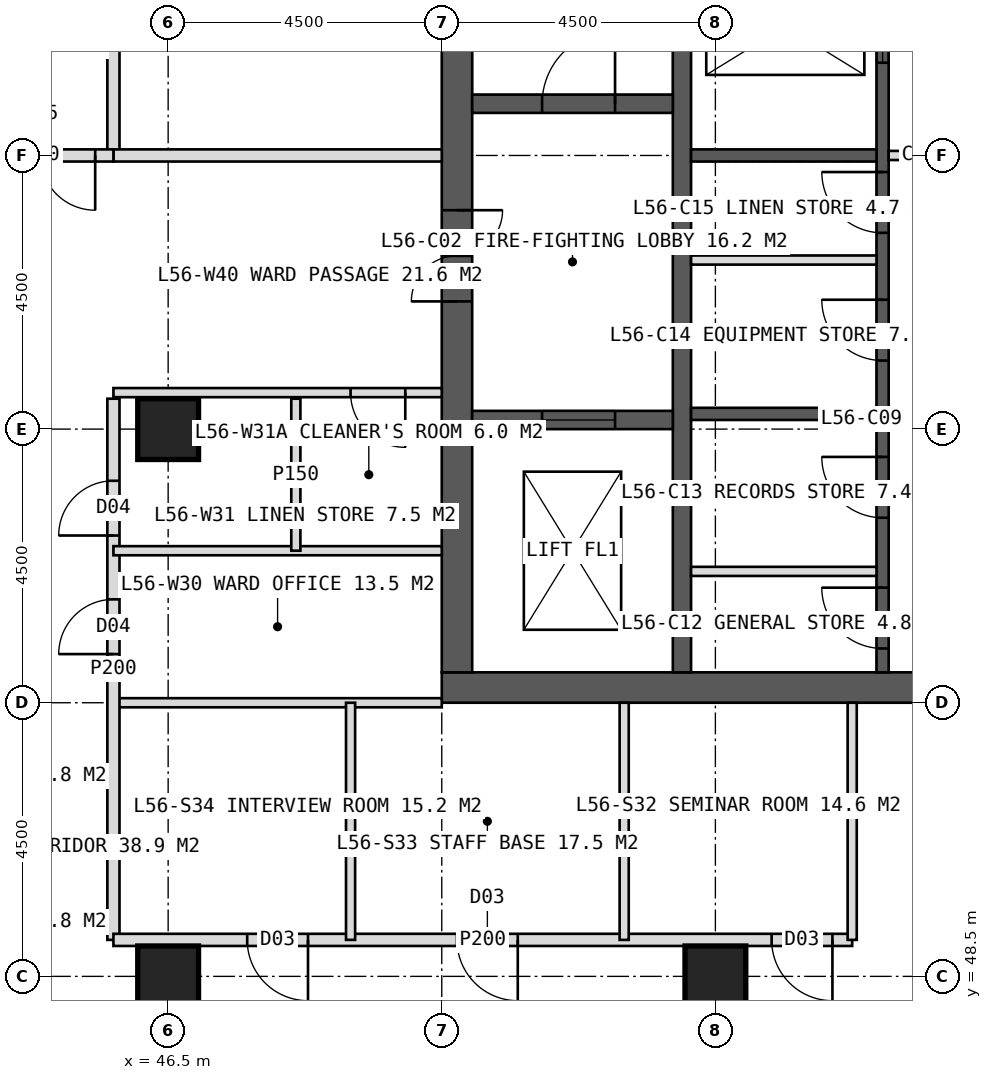
"""IFC4 building model, lengths in metres.
Left out: names, types, materials, properties, quantities, classifications, styles, units other than length and angle.
Written with IfcOpenShell. Run it as: python <this file> out.ifc"""

import sys

from ifc_helpers import new_model, si_unit, direction, frame, frame_2d, origin, origin_2d, place, context, subcontext, project, spatial, rectangle, hollow_rectangle, extrude, element, fill, save


model = new_model("IFC4")
c1 = context("Model", 3, precision=1e-05, world=origin(), true_north=direction((0.0, 1.0)))
c2 = subcontext(c1, "Body", "Model", "MODEL_VIEW")
j1 = project(units=[si_unit("LENGTHUNIT", "METRE"), si_unit("PLANEANGLEUNIT", "RADIAN")], contexts=[c1])
p1 = place(None, origin())
s1 = spatial("IfcSite", under=j1, at=p1, CompositionType="ELEMENT")
p2 = place(p1, origin())
s2 = spatial("IfcBuilding", under=s1, at=p2, CompositionType="ELEMENT")
p3 = place(p2, frame((0.0, 0.0, 233.0)))
s3 = spatial("IfcBuildingStorey", under=s2, at=p3, CompositionType="ELEMENT", Elevation=233.0)
p4 = place(p3, frame((51.0, 53.25, 0.0), z_axis=(0.0, 0.0, 1.0), x_axis=(1.0, 0.0, 0.0)))
e1 = element("IfcWall", 1, at=p4, inside=s3, PredefinedType="SHEAR", context=c2, shape_type="SweptSolid", body=[
    extrude(rectangle(XDim=18.0, YDim=0.5, at=frame_2d((9.0, 0.0))), origin(), (0.0, 0.0, 1.0), 4.0),
])
p5 = place(p4, frame((8.1, 0.0, 0.0)))
e2 = element("IfcOpeningElement", 2, at=p5, cuts=e1, PredefinedType="OPENING", context=c2, shape_type="SweptSolid", body=[
    extrude(rectangle(XDim=1.8, YDim=2.2, at=frame_2d((0.9, 1.1))), frame((0.0, 0.26, 0.0), z_axis=(0.0, -1.0, 0.0), x_axis=(1.0, 0.0, 0.0)), (0.0, 0.0, 1.0), 0.52),
])
p6 = place(p3, frame((51.25, 53.5, 0.0), z_axis=(0.0, 0.0, 1.0), x_axis=(0.0, 1.0, 0.0)))
e3 = element("IfcWall", 3, at=p6, inside=s3, PredefinedType="SHEAR", context=c2, shape_type="SweptSolid", body=[
    extrude(rectangle(XDim=17.0, YDim=0.5, at=frame_2d((8.5, 0.0))), origin(), (0.0, 0.0, 1.0), 4.0),
])
p7 = place(p6, frame((6.1, 0.0, 0.0)))
e4 = element("IfcOpeningElement", 4, at=p7, cuts=e3, PredefinedType="OPENING", context=c2, shape_type="SweptSolid", body=[
    extrude(rectangle(XDim=1.5, YDim=2.2, at=frame_2d((0.75, 1.1))), frame((0.0, 0.26, 0.0), z_axis=(0.0, -1.0, 0.0), x_axis=(1.0, 0.0, 0.0)), (0.0, 0.0, 1.0), 0.52),
])
p8 = place(p3, frame((54.95, 53.5, 0.0), z_axis=(0.0, 0.0, 1.0), x_axis=(0.0, 1.0, 0.0)))
e5 = element("IfcWall", 5, at=p8, inside=s3, PredefinedType="SHEAR", context=c2, shape_type="SweptSolid", body=[
    extrude(rectangle(XDim=17.0, YDim=0.3, at=frame_2d((8.5, 0.0))), origin(), (0.0, 0.0, 1.0), 4.0),
])
p9 = place(p3, frame((58.25, 53.5, 0.0), z_axis=(0.0, 0.0, 1.0), x_axis=(0.0, 1.0, 0.0)))
e6 = element("IfcWall", 6, at=p9, inside=s3, PredefinedType="SHEAR", context=c2, shape_type="SweptSolid", body=[
    extrude(rectangle(XDim=17.0, YDim=0.2, at=frame_2d((8.5, 0.0))), origin(), (0.0, 0.0, 1.0), 4.0),
])
p10 = place(p9, frame((0.393, 0.0, 0.0)))
e7 = element("IfcOpeningElement", 7, at=p10, cuts=e6, PredefinedType="OPENING", context=c2, shape_type="SweptSolid", body=[
    extrude(rectangle(XDim=1.0, YDim=2.1, at=frame_2d((0.5, 1.05))), frame((0.0, 0.11, 0.0), z_axis=(0.0, -1.0, 0.0), x_axis=(1.0, 0.0, 0.0)), (0.0, 0.0, 1.0), 0.22),
])
p11 = place(p9, frame((2.542, 0.0, 0.0)))
e8 = element("IfcOpeningElement", 8, at=p11, cuts=e6, PredefinedType="OPENING", context=c2, shape_type="SweptSolid", body=[
    extrude(rectangle(XDim=1.0, YDim=2.1, at=frame_2d((0.5, 1.05))), frame((0.0, 0.11, 0.0), z_axis=(0.0, -1.0, 0.0), x_axis=(1.0, 0.0, 0.0)), (0.0, 0.0, 1.0), 0.22),
])
p12 = place(p9, frame((5.127, 0.0, 0.0)))
e9 = element("IfcOpeningElement", 9, at=p12, cuts=e6, PredefinedType="OPENING", context=c2, shape_type="SweptSolid", body=[
    extrude(rectangle(XDim=1.0, YDim=2.1, at=frame_2d((0.5, 1.05))), frame((0.0, 0.11, 0.0), z_axis=(0.0, -1.0, 0.0), x_axis=(1.0, 0.0, 0.0)), (0.0, 0.0, 1.0), 0.22),
])
p13 = place(p9, frame((7.228, 0.0, 0.0)))
e10 = element("IfcOpeningElement", 10, at=p13, cuts=e6, PredefinedType="OPENING", context=c2, shape_type="SweptSolid", body=[
    extrude(rectangle(XDim=1.0, YDim=2.1, at=frame_2d((0.5, 1.05))), frame((0.0, 0.11, 0.0), z_axis=(0.0, -1.0, 0.0), x_axis=(1.0, 0.0, 0.0)), (0.0, 0.0, 1.0), 0.22),
])
p14 = place(p9, frame((10.025, 0.0, 0.0)))
e11 = element("IfcOpeningElement", 11, at=p14, cuts=e6, PredefinedType="OPENING", context=c2, shape_type="SweptSolid", body=[
    extrude(rectangle(XDim=1.4, YDim=2.2, at=frame_2d((0.7, 1.1))), frame((0.0, 0.11, 0.0), z_axis=(0.0, -1.0, 0.0), x_axis=(1.0, 0.0, 0.0)), (0.0, 0.0, 1.0), 0.22),
])
p15 = place(p9, frame((14.325, 0.0, 0.0)))
e12 = element("IfcOpeningElement", 12, at=p15, cuts=e6, PredefinedType="OPENING", context=c2, shape_type="SweptSolid", body=[
    extrude(rectangle(XDim=1.4, YDim=2.2, at=frame_2d((0.7, 1.1))), frame((0.0, 0.11, 0.0), z_axis=(0.0, -1.0, 0.0), x_axis=(1.0, 0.0, 0.0)), (0.0, 0.0, 1.0), 0.22),
])
for number, where, z_axis, x_axis in (
    (13, (55.1, 57.75, 0.0), (0.0, 0.0, 1.0), (1.0, 0.0, 0.0)),
    (14, (55.1, 62.0, 0.0), (0.0, 0.0, 1.0), (1.0, 0.0, 0.0)),
):
    element("IfcWall", number, at=place(p3, frame(where, z_axis=z_axis, x_axis=x_axis)), inside=s3, PredefinedType="SHEAR", context=c2, shape_type="SweptSolid", body=[
        extrude(rectangle(XDim=3.05, YDim=0.2, at=frame_2d((1.525, 0.0))), origin(), (0.0, 0.0, 1.0), 4.0),
    ])
p16 = place(p3, frame((51.5, 62.85, 0.0), z_axis=(0.0, 0.0, 1.0), x_axis=(1.0, 0.0, 0.0)))
e15 = element("IfcWall", 15, at=p16, inside=s3, PredefinedType="SHEAR", context=c2, shape_type="SweptSolid", body=[
    extrude(rectangle(XDim=3.3, YDim=0.3, at=frame_2d((1.65, 0.0))), origin(), (0.0, 0.0, 1.0), 4.0),
])
p17 = place(p16, frame((1.15, 0.0, 0.0)))
e16 = element("IfcOpeningElement", 16, at=p17, cuts=e15, PredefinedType="OPENING", context=c2, shape_type="SweptSolid", body=[
    extrude(rectangle(XDim=1.2, YDim=2.1, at=frame_2d((0.6, 1.05))), frame((0.0, 0.16, 0.0), z_axis=(0.0, -1.0, 0.0), x_axis=(1.0, 0.0, 0.0)), (0.0, 0.0, 1.0), 0.32),
])
p18 = place(p3, frame((51.5, 57.65, 0.0), z_axis=(0.0, 0.0, 1.0), x_axis=(1.0, 0.0, 0.0)))
e17 = element("IfcWall", 17, at=p18, inside=s3, PredefinedType="SHEAR", context=c2, shape_type="SweptSolid", body=[
    extrude(rectangle(XDim=3.3, YDim=0.3, at=frame_2d((1.65, 0.0))), origin(), (0.0, 0.0, 1.0), 4.0),
])
p19 = place(p18, frame((1.15, 0.0, 0.0)))
e18 = element("IfcOpeningElement", 18, at=p19, cuts=e17, PredefinedType="OPENING", context=c2, shape_type="SweptSolid", body=[
    extrude(rectangle(XDim=1.2, YDim=2.2, at=frame_2d((0.6, 1.1))), frame((0.0, 0.16, 0.0), z_axis=(0.0, -1.0, 0.0), x_axis=(1.0, 0.0, 0.0)), (0.0, 0.0, 1.0), 0.32),
])
for number, where, z_axis, x_axis in (
    (19, (46.5, 48.5, 0.0), (0.0, 0.0, 1.0), (1.0, 0.0, 0.0)),
    (20, (55.5, 48.5, 0.0), (0.0, 0.0, 1.0), (1.0, 0.0, 0.0)),
    (21, (46.5, 57.5, 0.0), (0.0, 0.0, 1.0), (1.0, 0.0, 0.0)),
):
    element("IfcColumn", number, at=place(p3, frame(where, z_axis=z_axis, x_axis=x_axis)), inside=s3, PredefinedType="COLUMN", context=c2, shape_type="SweptSolid", body=[
        extrude(hollow_rectangle(XDim=1.0, YDim=1.0, WallThickness=0.1, at=origin_2d()), origin(), (0.0, 0.0, 1.0), 4.0),
    ])
p20 = place(p3, frame((51.0, 53.0, 0.0), z_axis=(0.0, 0.0, 1.0), x_axis=(-1.0, 0.0, 0.0)))
e22 = element("IfcWall", 22, at=p20, inside=s3, PredefinedType="PARTITIONING", context=c2, shape_type="SweptSolid", body=[
    extrude(rectangle(XDim=5.4, YDim=0.15, at=frame_2d((2.7, 0.0))), origin(), (0.0, 0.0, 1.0), 3.75),
])
p21 = place(p3, frame((45.6, 49.1, 0.0), z_axis=(0.0, 0.0, 1.0), x_axis=(0.0, 1.0, 0.0)))
e23 = element("IfcWall", 23, at=p21, inside=s3, PredefinedType="PARTITIONING", context=c2, shape_type="SweptSolid", body=[
    extrude(rectangle(XDim=8.9, YDim=0.2, at=frame_2d((4.45, 0.0))), origin(), (0.0, 0.0, 1.0), 3.75),
])
p22 = place(p21, frame((4.7, 0.0, 0.0)))
e24 = element("IfcOpeningElement", 24, at=p22, cuts=e23, PredefinedType="OPENING", context=c2, shape_type="SweptSolid", body=[
    extrude(rectangle(XDim=0.9, YDim=2.1, at=frame_2d((0.45, 1.05))), frame((0.0, 0.11, 0.0), z_axis=(0.0, -1.0, 0.0), x_axis=(1.0, 0.0, 0.0)), (0.0, 0.0, 1.0), 0.22),
])
p23 = place(p21, frame((6.65, 0.0, 0.0)))
e25 = element("IfcOpeningElement", 25, at=p23, cuts=e23, PredefinedType="OPENING", context=c2, shape_type="SweptSolid", body=[
    extrude(rectangle(XDim=0.9, YDim=2.1, at=frame_2d((0.45, 1.05))), frame((0.0, 0.11, 0.0), z_axis=(0.0, -1.0, 0.0), x_axis=(1.0, 0.0, 0.0)), (0.0, 0.0, 1.0), 0.22),
])
p24 = place(p3, frame((45.6, 62.0, 0.0), z_axis=(0.0, 0.0, 1.0), x_axis=(0.0, 1.0, 0.0)))
e26 = element("IfcWall", 26, at=p24, inside=s3, PredefinedType="PARTITIONING", context=c2, shape_type="SweptSolid", body=[
    extrude(rectangle(XDim=14.4, YDim=0.2, at=frame_2d((7.2, 0.0))), origin(), (0.0, 0.0, 1.0), 3.75),
])
p25 = place(p24, frame((2.5, 0.0, 0.0)))
e27 = element("IfcOpeningElement", 27, at=p25, cuts=e26, PredefinedType="OPENING", context=c2, shape_type="SweptSolid", body=[
    extrude(rectangle(XDim=1.0, YDim=2.1, at=frame_2d((0.5, 1.05))), frame((0.0, 0.11, 0.0), z_axis=(0.0, -1.0, 0.0), x_axis=(1.0, 0.0, 0.0)), (0.0, 0.0, 1.0), 0.22),
])
p26 = place(p24, frame((7.0, 0.0, 0.0)))
e28 = element("IfcOpeningElement", 28, at=p26, cuts=e26, PredefinedType="OPENING", context=c2, shape_type="SweptSolid", body=[
    extrude(rectangle(XDim=1.0, YDim=2.1, at=frame_2d((0.5, 1.05))), frame((0.0, 0.11, 0.0), z_axis=(0.0, -1.0, 0.0), x_axis=(1.0, 0.0, 0.0)), (0.0, 0.0, 1.0), 0.22),
])
p27 = place(p24, frame((11.2, 0.0, 0.0)))
e29 = element("IfcOpeningElement", 29, at=p27, cuts=e26, PredefinedType="OPENING", context=c2, shape_type="SweptSolid", body=[
    extrude(rectangle(XDim=1.0, YDim=2.1, at=frame_2d((0.5, 1.05))), frame((0.0, 0.11, 0.0), z_axis=(0.0, -1.0, 0.0), x_axis=(1.0, 0.0, 0.0)), (0.0, 0.0, 1.0), 0.22),
])
p28 = place(p3, frame((51.0, 58.1, 0.0), z_axis=(0.0, 0.0, 1.0), x_axis=(-1.0, 0.0, 0.0)))
e30 = element("IfcWall", 30, at=p28, inside=s3, PredefinedType="PARTITIONING", context=c2, shape_type="SweptSolid", body=[
    extrude(rectangle(XDim=5.4, YDim=0.15, at=frame_2d((2.7, 0.0))), origin(), (0.0, 0.0, 1.0), 3.75),
])
p29 = place(p28, frame((0.6, 0.0, 0.0)))
e31 = element("IfcOpeningElement", 31, at=p29, cuts=e30, PredefinedType="OPENING", context=c2, shape_type="SweptSolid", body=[
    extrude(rectangle(XDim=0.9, YDim=2.1, at=frame_2d((0.45, 1.05))), frame((0.0, 0.085, 0.0), z_axis=(0.0, -1.0, 0.0), x_axis=(1.0, 0.0, 0.0)), (0.0, 0.0, 1.0), 0.17),
])
p30 = place(p3, frame((51.0, 62.0, 0.0), z_axis=(0.0, 0.0, 1.0), x_axis=(-1.0, 0.0, 0.0)))
e32 = element("IfcWall", 32, at=p30, inside=s3, PredefinedType="SOLIDWALL", context=c2, shape_type="SweptSolid", body=[
    extrude(rectangle(XDim=5.4, YDim=0.2, at=frame_2d((2.7, 0.0))), origin(), (0.0, 0.0, 1.0), 2.95),
])
p31 = place(p3, frame((51.0, 55.5, 0.0), z_axis=(0.0, 0.0, 1.0), x_axis=(-1.0, 0.0, 0.0)))
e33 = element("IfcWall", 33, at=p31, inside=s3, PredefinedType="PARTITIONING", context=c2, shape_type="SweptSolid", body=[
    extrude(rectangle(XDim=5.4, YDim=0.15, at=frame_2d((2.7, 0.0))), origin(), (0.0, 0.0, 1.0), 3.75),
])
p32 = place(p3, frame((48.6, 55.5, 0.0), z_axis=(0.0, 0.0, 1.0), x_axis=(0.0, 1.0, 0.0)))
e34 = element("IfcWall", 34, at=p32, inside=s3, PredefinedType="PARTITIONING", context=c2, shape_type="SweptSolid", body=[
    extrude(rectangle(XDim=2.5, YDim=0.15, at=frame_2d((1.25, 0.0))), origin(), (0.0, 0.0, 1.0), 3.75),
])
p33 = place(p3, frame((57.75, 49.1, 0.0), z_axis=(0.0, 0.0, 1.0), x_axis=(-1.0, 0.0, 0.0)))
e35 = element("IfcWall", 35, at=p33, inside=s3, PredefinedType="PARTITIONING", context=c2, shape_type="SweptSolid", body=[
    extrude(rectangle(XDim=12.15, YDim=0.2, at=frame_2d((6.075, 0.0))), origin(), (0.0, 0.0, 1.0), 3.75),
])
p34 = place(p33, frame((0.325, 0.0, 0.0)))
e36 = element("IfcOpeningElement", 36, at=p34, cuts=e35, PredefinedType="OPENING", context=c2, shape_type="SweptSolid", body=[
    extrude(rectangle(XDim=1.0, YDim=2.1, at=frame_2d((0.5, 1.05))), frame((0.0, 0.11, 0.0), z_axis=(0.0, -1.0, 0.0), x_axis=(1.0, 0.0, 0.0)), (0.0, 0.0, 1.0), 0.22),
])
p35 = place(p33, frame((5.5, 0.0, 0.0)))
e37 = element("IfcOpeningElement", 37, at=p35, cuts=e35, PredefinedType="OPENING", context=c2, shape_type="SweptSolid", body=[
    extrude(rectangle(XDim=1.0, YDim=2.1, at=frame_2d((0.5, 1.05))), frame((0.0, 0.11, 0.0), z_axis=(0.0, -1.0, 0.0), x_axis=(1.0, 0.0, 0.0)), (0.0, 0.0, 1.0), 0.22),
])
p36 = place(p33, frame((8.95, 0.0, 0.0)))
e38 = element("IfcOpeningElement", 38, at=p36, cuts=e35, PredefinedType="OPENING", context=c2, shape_type="SweptSolid", body=[
    extrude(rectangle(XDim=1.0, YDim=2.1, at=frame_2d((0.5, 1.05))), frame((0.0, 0.11, 0.0), z_axis=(0.0, -1.0, 0.0), x_axis=(1.0, 0.0, 0.0)), (0.0, 0.0, 1.0), 0.22),
])
for number, where, z_axis, x_axis in (
    (39, (57.75, 53.0, 0.0), (0.0, 0.0, 1.0), (0.0, -1.0, 0.0)),
    (40, (54.0, 53.0, 0.0), (0.0, 0.0, 1.0), (0.0, -1.0, 0.0)),
    (41, (49.5, 53.0, 0.0), (0.0, 0.0, 1.0), (0.0, -1.0, 0.0)),
):
    element("IfcWall", number, at=place(p3, frame(where, z_axis=z_axis, x_axis=x_axis)), inside=s3, PredefinedType="PARTITIONING", context=c2, shape_type="SweptSolid", body=[
        extrude(rectangle(XDim=3.9, YDim=0.15, at=frame_2d((1.95, 0.0))), origin(), (0.0, 0.0, 1.0), 3.75),
    ])
p37 = place(p3, frame((45.6, 62.0, 0.0), z_axis=(0.0, 0.0, 1.0), x_axis=(-1.0, 0.0, 0.0)))
e42 = element("IfcWall", 42, at=p37, inside=s3, PredefinedType="SOLIDWALL", context=c2, shape_type="SweptSolid", body=[
    extrude(rectangle(XDim=2.7, YDim=0.2, at=frame_2d((1.35, 0.0))), origin(), (0.0, 0.0, 1.0), 2.95),
])
p38 = place(p37, frame((0.3, 0.0, 0.0)))
e43 = element("IfcOpeningElement", 43, at=p38, cuts=e42, PredefinedType="OPENING", context=c2, shape_type="SweptSolid", body=[
    extrude(rectangle(XDim=1.8, YDim=2.2, at=frame_2d((0.9, 1.1))), frame((0.0, 0.11, 0.0), z_axis=(0.0, -1.0, 0.0), x_axis=(1.0, 0.0, 0.0)), (0.0, 0.0, 1.0), 0.22),
])
for number, where, z_axis, x_axis in (
    (44, (55.1, 55.16, 0.0), (0.0, 0.0, 1.0), (1.0, 0.0, 0.0)),
    (45, (55.1, 60.28, 0.0), (0.0, 0.0, 1.0), (1.0, 0.0, 0.0)),
):
    element("IfcWall", number, at=place(p3, frame(where, z_axis=z_axis, x_axis=x_axis)), inside=s3, PredefinedType="PARTITIONING", context=c2, shape_type="SweptSolid", body=[
        extrude(rectangle(XDim=3.05, YDim=0.15, at=frame_2d((1.525, 0.0))), origin(), (0.0, 0.0, 1.0), 3.75),
    ])
p39 = place(p3, frame((58.35, 62.0, 0.0), z_axis=(0.0, 0.0, 1.0), x_axis=(1.0, 0.0, 0.0)))
e46 = element("IfcWall", 46, at=p39, inside=s3, PredefinedType="PARTITIONING", context=c2, shape_type="SweptSolid", body=[
    extrude(rectangle(XDim=3.3, YDim=0.15, at=frame_2d((1.65, 0.0))), origin(), (0.0, 0.0, 1.0), 3.75),
])
p40 = place(p22, origin())
e47 = element("IfcDoor", 47, at=p40, inside=s3, OperationType="SINGLE_SWING_LEFT", PredefinedType="DOOR", context=c2, shape_type="SweptSolid", body=[
    extrude(rectangle(XDim=0.9, YDim=2.1, at=frame_2d((0.45, 1.05))), frame((0.0, 0.025, 0.0), z_axis=(0.0, -1.0, 0.0), x_axis=(1.0, 0.0, 0.0)), (0.0, 0.0, 1.0), 0.05),
])
fill(e24, e47)
p41 = place(p29, origin())
e48 = element("IfcDoor", 48, at=p41, inside=s3, OperationType="SINGLE_SWING_LEFT", PredefinedType="DOOR", context=c2, shape_type="SweptSolid", body=[
    extrude(rectangle(XDim=0.9, YDim=2.1, at=frame_2d((0.45, 1.05))), frame((0.0, 0.025, 0.0), z_axis=(0.0, -1.0, 0.0), x_axis=(1.0, 0.0, 0.0)), (0.0, 0.0, 1.0), 0.05),
])
fill(e31, e48)
p42 = place(p23, origin())
e49 = element("IfcDoor", 49, at=p42, inside=s3, OperationType="SINGLE_SWING_LEFT", PredefinedType="DOOR", context=c2, shape_type="SweptSolid", body=[
    extrude(rectangle(XDim=0.9, YDim=2.1, at=frame_2d((0.45, 1.05))), frame((0.0, 0.025, 0.0), z_axis=(0.0, -1.0, 0.0), x_axis=(1.0, 0.0, 0.0)), (0.0, 0.0, 1.0), 0.05),
])
fill(e25, e49)
p43 = place(p34, origin())
e50 = element("IfcDoor", 50, at=p43, inside=s3, OperationType="SINGLE_SWING_LEFT", PredefinedType="DOOR", context=c2, shape_type="SweptSolid", body=[
    extrude(rectangle(XDim=1.0, YDim=2.1, at=frame_2d((0.5, 1.05))), frame((0.0, 0.025, 0.0), z_axis=(0.0, -1.0, 0.0), x_axis=(1.0, 0.0, 0.0)), (0.0, 0.0, 1.0), 0.05),
])
fill(e36, e50)
p44 = place(p35, origin())
e51 = element("IfcDoor", 51, at=p44, inside=s3, OperationType="SINGLE_SWING_LEFT", PredefinedType="DOOR", context=c2, shape_type="SweptSolid", body=[
    extrude(rectangle(XDim=1.0, YDim=2.1, at=frame_2d((0.5, 1.05))), frame((0.0, 0.025, 0.0), z_axis=(0.0, -1.0, 0.0), x_axis=(1.0, 0.0, 0.0)), (0.0, 0.0, 1.0), 0.05),
])
fill(e37, e51)
p45 = place(p36, origin())
e52 = element("IfcDoor", 52, at=p45, inside=s3, OperationType="SINGLE_SWING_LEFT", PredefinedType="DOOR", context=c2, shape_type="SweptSolid", body=[
    extrude(rectangle(XDim=1.0, YDim=2.1, at=frame_2d((0.5, 1.05))), frame((0.0, 0.025, 0.0), z_axis=(0.0, -1.0, 0.0), x_axis=(1.0, 0.0, 0.0)), (0.0, 0.0, 1.0), 0.05),
])
fill(e38, e52)
p46 = place(p38, origin())
e53 = element("IfcDoor", 53, at=p46, inside=s3, OperationType="DOUBLE_DOOR_DOUBLE_SWING", PredefinedType="DOOR", context=c2, shape_type="SweptSolid", body=[
    extrude(rectangle(XDim=1.8, YDim=2.2, at=frame_2d((0.9, 1.1))), frame((0.0, 0.025, 0.0), z_axis=(0.0, -1.0, 0.0), x_axis=(1.0, 0.0, 0.0)), (0.0, 0.0, 1.0), 0.05),
])
fill(e43, e53)
p47 = place(p7, origin())
e54 = element("IfcDoor", 54, at=p47, inside=s3, OperationType="DOUBLE_DOOR_SINGLE_SWING", PredefinedType="DOOR", context=c2, shape_type="SweptSolid", body=[
    extrude(rectangle(XDim=1.5, YDim=2.2, at=frame_2d((0.75, 1.1))), frame((0.0, 0.025, 0.0), z_axis=(0.0, -1.0, 0.0), x_axis=(1.0, 0.0, 0.0)), (0.0, 0.0, 1.0), 0.05),
])
fill(e4, e54)
p48 = place(p17, origin())
e55 = element("IfcDoor", 55, at=p48, inside=s3, OperationType="SINGLE_SWING_RIGHT", PredefinedType="DOOR", context=c2, shape_type="SweptSolid", body=[
    extrude(rectangle(XDim=1.2, YDim=2.1, at=frame_2d((0.6, 1.05))), frame((0.0, 0.025, 0.0), z_axis=(0.0, -1.0, 0.0), x_axis=(1.0, 0.0, 0.0)), (0.0, 0.0, 1.0), 0.05),
])
fill(e16, e55)
p49 = place(p19, origin())
e56 = element("IfcDoor", 56, at=p49, inside=s3, OperationType="SLIDING_TO_LEFT", PredefinedType="DOOR", context=c2, shape_type="SweptSolid", body=[
    extrude(rectangle(XDim=1.2, YDim=2.2, at=frame_2d((0.6, 1.1))), frame((0.0, 0.025, 0.0), z_axis=(0.0, -1.0, 0.0), x_axis=(1.0, 0.0, 0.0)), (0.0, 0.0, 1.0), 0.05),
])
fill(e18, e56)
p50 = place(p10, origin())
e57 = element("IfcDoor", 57, at=p50, inside=s3, OperationType="SINGLE_SWING_RIGHT", PredefinedType="DOOR", context=c2, shape_type="SweptSolid", body=[
    extrude(rectangle(XDim=1.0, YDim=2.1, at=frame_2d((0.5, 1.05))), frame((0.0, 0.025, 0.0), z_axis=(0.0, -1.0, 0.0), x_axis=(1.0, 0.0, 0.0)), (0.0, 0.0, 1.0), 0.05),
])
fill(e7, e57)
p51 = place(p11, origin())
e58 = element("IfcDoor", 58, at=p51, inside=s3, OperationType="SINGLE_SWING_RIGHT", PredefinedType="DOOR", context=c2, shape_type="SweptSolid", body=[
    extrude(rectangle(XDim=1.0, YDim=2.1, at=frame_2d((0.5, 1.05))), frame((0.0, 0.025, 0.0), z_axis=(0.0, -1.0, 0.0), x_axis=(1.0, 0.0, 0.0)), (0.0, 0.0, 1.0), 0.05),
])
fill(e8, e58)
p52 = place(p12, origin())
e59 = element("IfcDoor", 59, at=p52, inside=s3, OperationType="SINGLE_SWING_RIGHT", PredefinedType="DOOR", context=c2, shape_type="SweptSolid", body=[
    extrude(rectangle(XDim=1.0, YDim=2.1, at=frame_2d((0.5, 1.05))), frame((0.0, 0.025, 0.0), z_axis=(0.0, -1.0, 0.0), x_axis=(1.0, 0.0, 0.0)), (0.0, 0.0, 1.0), 0.05),
])
fill(e9, e59)
p53 = place(p13, origin())
e60 = element("IfcDoor", 60, at=p53, inside=s3, OperationType="SINGLE_SWING_RIGHT", PredefinedType="DOOR", context=c2, shape_type="SweptSolid", body=[
    extrude(rectangle(XDim=1.0, YDim=2.1, at=frame_2d((0.5, 1.05))), frame((0.0, 0.025, 0.0), z_axis=(0.0, -1.0, 0.0), x_axis=(1.0, 0.0, 0.0)), (0.0, 0.0, 1.0), 0.05),
])
fill(e10, e60)
p54 = place(p14, origin())
e61 = element("IfcDoor", 61, at=p54, inside=s3, OperationType="SLIDING_TO_LEFT", PredefinedType="DOOR", context=c2, shape_type="SweptSolid", body=[
    extrude(rectangle(XDim=1.4, YDim=2.2, at=frame_2d((0.7, 1.1))), frame((0.0, 0.025, 0.0), z_axis=(0.0, -1.0, 0.0), x_axis=(1.0, 0.0, 0.0)), (0.0, 0.0, 1.0), 0.05),
])
fill(e11, e61)
save(model, sys.argv[1])
